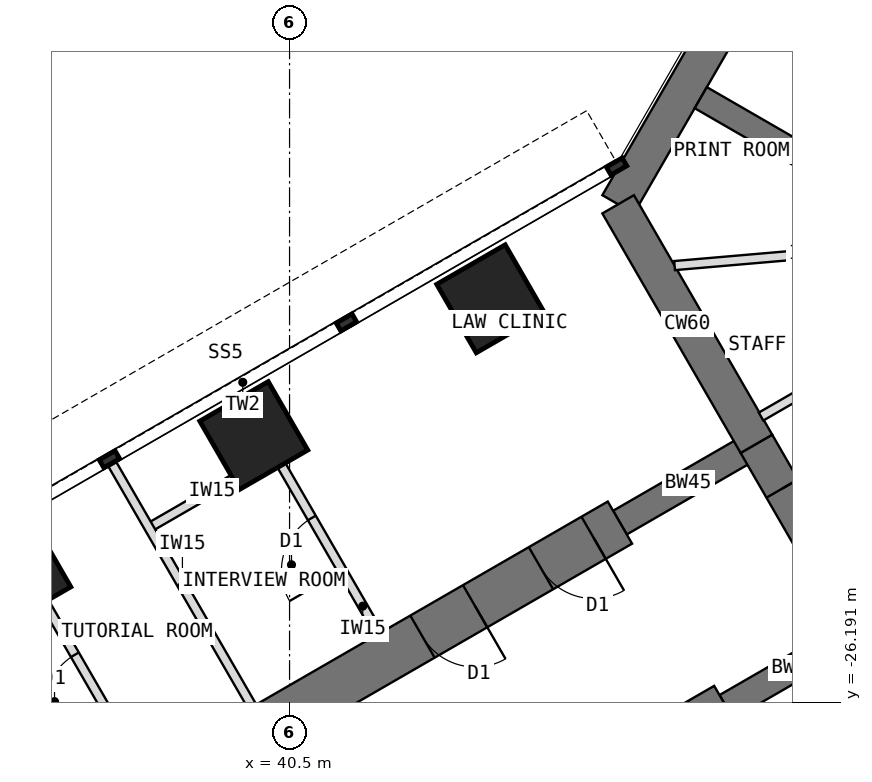
"""IFC4 building model, lengths in metres.
Left out: names, types, materials, properties, quantities, classifications, styles, units other than length and angle.
Written with IfcOpenShell. Run it as: python <this file> out.ifc"""

import sys

from ifc_helpers import new_model, si_unit, direction, frame, frame_2d, origin, origin_2d, place, context, subcontext, project, spatial, rectangle, extrude, element, fill, save


model = new_model("IFC4")
c1 = context("Model", 3, precision=1e-05, world=origin(), true_north=direction((0.0, 1.0)))
c2 = subcontext(c1, "Body", "Model", "MODEL_VIEW")
j1 = project(units=[si_unit("LENGTHUNIT", "METRE"), si_unit("PLANEANGLEUNIT", "RADIAN")], contexts=[c1])
p1 = place(None, origin())
s1 = spatial("IfcSite", under=j1, at=p1, CompositionType="ELEMENT")
p2 = place(p1, origin())
s2 = spatial("IfcBuilding", under=s1, at=p2, CompositionType="ELEMENT")
p3 = place(p2, frame((0.0, 0.0, 133.5)))
s3 = spatial("IfcBuildingStorey", under=s2, at=p3, CompositionType="ELEMENT", Elevation=133.5)
p4 = place(p3, frame((52.202, -7.092, 0.0), z_axis=(0.0, 0.0, 1.0), x_axis=(-0.500005998175, -0.866021940709, 0.0)))
e1 = element("IfcWall", 1, at=p4, inside=s3, PredefinedType="SHEAR", context=c2, shape_type="SweptSolid", body=[
    extrude(rectangle(XDim=12.596, YDim=0.6, at=frame_2d((6.298, 0.0))), origin(), (0.0, 0.0, 1.0), 4.0),
])
p5 = place(p3, frame((45.904, -18.0, 0.0), z_axis=(0.0, 0.0, 1.0), x_axis=(0.500024481964, -0.866011268655, 0.0)))
e2 = element("IfcWall", 2, at=p5, inside=s3, PredefinedType="SHEAR", context=c2, shape_type="SweptSolid", body=[
    extrude(rectangle(XDim=4.548, YDim=0.6, at=frame_2d((2.274, 0.0))), origin(), (0.0, 0.0, 1.0), 4.0),
])
p6 = place(p3, frame((48.178, -21.939, 0.0), z_axis=(0.0, 0.0, 1.0), x_axis=(0.500010275428, -0.866019471182, 0.0)))
e3 = element("IfcWall", 3, at=p6, inside=s3, PredefinedType="SHEAR", context=c2, shape_type="SweptSolid", body=[
    extrude(rectangle(XDim=3.5, YDim=0.6, at=frame_2d((1.75, 0.0))), origin(), (0.0, 0.0, 1.0), 4.0),
])
p7 = place(p6, frame((0.85, 0.0, 0.0)))
e4 = element("IfcOpeningElement", 4, at=p7, cuts=e3, PredefinedType="OPENING", context=c2, shape_type="SweptSolid", body=[
    extrude(rectangle(XDim=1.8, YDim=2.1, at=frame_2d((0.9, 1.05))), frame((0.0, 0.31, 0.0), z_axis=(0.0, -1.0, 0.0), x_axis=(1.0, 0.0, 0.0)), (0.0, 0.0, 1.0), 0.62),
])
p8 = place(p3, frame((49.928, -24.97, 0.0), z_axis=(0.0, 0.0, 1.0), x_axis=(-0.866031863473, -0.499988811324, 0.0)))
e5 = element("IfcWall", 5, at=p8, inside=s3, PredefinedType="SHEAR", context=c2, shape_type="SweptSolid", body=[
    extrude(rectangle(XDim=2.592, YDim=0.45, at=frame_2d((1.296, 0.0))), origin(), (0.0, 0.0, 1.0), 4.0),
])
p9 = place(p3, frame((47.684, -26.266, 0.0), z_axis=(0.0, 0.0, 1.0), x_axis=(-0.866027579429, -0.499996231654, 0.0)))
e6 = element("IfcWall", 6, at=p9, inside=s3, PredefinedType="SHEAR", context=c2, shape_type="SweptSolid", body=[
    extrude(rectangle(XDim=13.2, YDim=0.8, at=frame_2d((6.6, 0.0))), origin(), (0.0, 0.0, 1.0), 4.0),
])
p10 = place(p9, frame((0.5, 0.0, 0.0)))
e7 = element("IfcOpeningElement", 7, at=p10, cuts=e6, PredefinedType="OPENING", context=c2, shape_type="SweptSolid", body=[
    extrude(rectangle(XDim=1.0, YDim=2.1, at=frame_2d((0.5, 1.05))), frame((0.0, 0.41, 0.0), z_axis=(0.0, -1.0, 0.0), x_axis=(1.0, 0.0, 0.0)), (0.0, 0.0, 1.0), 0.82),
])
p11 = place(p9, frame((2.75, 0.0, 0.0)))
e8 = element("IfcOpeningElement", 8, at=p11, cuts=e6, PredefinedType="OPENING", context=c2, shape_type="SweptSolid", body=[
    extrude(rectangle(XDim=1.0, YDim=2.1, at=frame_2d((0.5, 1.05))), frame((0.0, 0.41, 0.0), z_axis=(0.0, -1.0, 0.0), x_axis=(1.0, 0.0, 0.0)), (0.0, 0.0, 1.0), 0.82),
])
p12 = place(p9, frame((7.25, 0.0, 0.0)))
e9 = element("IfcOpeningElement", 9, at=p12, cuts=e6, PredefinedType="OPENING", context=c2, shape_type="SweptSolid", body=[
    extrude(rectangle(XDim=1.0, YDim=2.1, at=frame_2d((0.5, 1.05))), frame((0.0, 0.41, 0.0), z_axis=(0.0, -1.0, 0.0), x_axis=(1.0, 0.0, 0.0)), (0.0, 0.0, 1.0), 0.82),
])
p13 = place(p3, frame((48.178, -21.939, 0.0), z_axis=(0.0, 0.0, 1.0), x_axis=(-0.866072649678, -0.499918158782, 0.0)))
e10 = element("IfcWall", 10, at=p13, inside=s3, PredefinedType="SHEAR", context=c2, shape_type="SweptSolid", body=[
    extrude(rectangle(XDim=2.592, YDim=0.45, at=frame_2d((1.296, 0.0))), origin(), (0.0, 0.0, 1.0), 4.0),
])
p14 = place(p3, frame((45.934, -23.234, 0.0), z_axis=(0.0, 0.0, 1.0), x_axis=(-0.866019570528, -0.500010103361, 0.0)))
e11 = element("IfcWall", 11, at=p14, inside=s3, PredefinedType="SHEAR", context=c2, shape_type="SweptSolid", body=[
    extrude(rectangle(XDim=13.2, YDim=0.8, at=frame_2d((6.6, 0.0))), origin(), (0.0, 0.0, 1.0), 4.0),
])
p15 = place(p14, frame((0.5, 0.0, 0.0)))
e12 = element("IfcOpeningElement", 12, at=p15, cuts=e11, PredefinedType="OPENING", context=c2, shape_type="SweptSolid", body=[
    extrude(rectangle(XDim=1.0, YDim=2.1, at=frame_2d((0.5, 1.05))), frame((0.0, 0.41, 0.0), z_axis=(0.0, -1.0, 0.0), x_axis=(1.0, 0.0, 0.0)), (0.0, 0.0, 1.0), 0.82),
])
p16 = place(p14, frame((2.75, 0.0, 0.0)))
e13 = element("IfcOpeningElement", 13, at=p16, cuts=e11, PredefinedType="OPENING", context=c2, shape_type="SweptSolid", body=[
    extrude(rectangle(XDim=1.0, YDim=2.1, at=frame_2d((0.5, 1.05))), frame((0.0, 0.41, 0.0), z_axis=(0.0, -1.0, 0.0), x_axis=(1.0, 0.0, 0.0)), (0.0, 0.0, 1.0), 0.82),
])
p17 = place(p14, frame((7.25, 0.0, 0.0)))
e14 = element("IfcOpeningElement", 14, at=p17, cuts=e11, PredefinedType="OPENING", context=c2, shape_type="SweptSolid", body=[
    extrude(rectangle(XDim=1.0, YDim=2.1, at=frame_2d((0.5, 1.05))), frame((0.0, 0.41, 0.0), z_axis=(0.0, -1.0, 0.0), x_axis=(1.0, 0.0, 0.0)), (0.0, 0.0, 1.0), 0.82),
])
for number, where, z_axis, x_axis in (
    (15, (43.809, -19.554, 0.0), (0.0, 0.0, 1.0), (0.866, 0.5, 0.0)),
    (16, (39.912, -21.804, 0.0), (0.0, 0.0, 1.0), (0.866, 0.5, 0.0)),
    (17, (36.014, -24.054, 0.0), (0.0, 0.0, 1.0), (0.866, 0.5, 0.0)),
):
    element("IfcColumn", number, at=place(p3, frame(where, z_axis=z_axis, x_axis=x_axis)), inside=s3, PredefinedType="COLUMN", context=c2, shape_type="SweptSolid", body=[
        extrude(rectangle(XDim=1.3, YDim=1.3, at=origin_2d()), origin(), (0.0, 0.0, 1.0), 4.0),
    ])
p18 = place(p3, frame((52.38, -19.201, 0.0), z_axis=(0.0, 0.0, 1.0), x_axis=(-0.866027317282, 0.49999668571, 0.0)))
e18 = element("IfcWall", 18, at=p18, inside=s3, PredefinedType="SHEAR", context=c2, shape_type="SweptSolid", body=[
    extrude(rectangle(XDim=5.908, YDim=0.4, at=frame_2d((2.954, 0.0))), origin(), (0.0, 0.0, 1.0), 4.0),
])
p19 = place(p3, frame((39.888, -26.263, 0.0), z_axis=(0.0, 0.0, 1.0), x_axis=(-0.500014953309, 0.866016770315, 0.0)))
e19 = element("IfcWall", 19, at=p19, inside=s3, PredefinedType="PARTITIONING", context=c2, shape_type="SweptSolid", body=[
    extrude(rectangle(XDim=4.6, YDim=0.15, at=frame_2d((2.3, 0.0))), origin(), (0.0, 0.0, 1.0), 3.8),
])
p20 = place(p3, frame((40.266, -22.119, 0.0), z_axis=(0.0, 0.0, 1.0), x_axis=(-0.866024647952, -0.500001309137, 0.0)))
e20 = element("IfcWall", 20, at=p20, inside=s3, PredefinedType="PARTITIONING", context=c2, shape_type="SweptSolid", body=[
    extrude(rectangle(XDim=2.4, YDim=0.15, at=frame_2d((1.2, 0.0))), origin(), (0.0, 0.0, 1.0), 3.8),
])
p21 = place(p3, frame((41.967, -25.063, 0.0), z_axis=(0.0, 0.0, 1.0), x_axis=(-0.500062241894, 0.865989465428, 0.0)))
e21 = element("IfcWall", 21, at=p21, inside=s3, PredefinedType="PARTITIONING", context=c2, shape_type="SweptSolid", body=[
    extrude(rectangle(XDim=3.4, YDim=0.15, at=frame_2d((1.7, 0.0))), origin(), (0.0, 0.0, 1.0), 3.8),
])
p22 = place(p21, frame((1.2, 0.0, 0.0)))
e22 = element("IfcOpeningElement", 22, at=p22, cuts=e21, PredefinedType="OPENING", context=c2, shape_type="SweptSolid", body=[
    extrude(rectangle(XDim=1.0, YDim=2.1, at=frame_2d((0.5, 1.05))), frame((0.0, 0.085, 0.0), z_axis=(0.0, -1.0, 0.0), x_axis=(1.0, 0.0, 0.0)), (0.0, 0.0, 1.0), 0.17),
])
p23 = place(p3, frame((38.069, -27.313, 0.0), z_axis=(0.0, 0.0, 1.0), x_axis=(-0.500008388397, 0.866020560687, 0.0)))
e23 = element("IfcWall", 23, at=p23, inside=s3, PredefinedType="PARTITIONING", context=c2, shape_type="SweptSolid", body=[
    extrude(rectangle(XDim=3.4, YDim=0.15, at=frame_2d((1.7, 0.0))), origin(), (0.0, 0.0, 1.0), 3.8),
])
p24 = place(p23, frame((1.2, 0.0, 0.0)))
e24 = element("IfcOpeningElement", 24, at=p24, cuts=e23, PredefinedType="OPENING", context=c2, shape_type="SweptSolid", body=[
    extrude(rectangle(XDim=1.0, YDim=2.1, at=frame_2d((0.5, 1.05))), frame((0.0, 0.085, 0.0), z_axis=(0.0, -1.0, 0.0), x_axis=(1.0, 0.0, 0.0)), (0.0, 0.0, 1.0), 0.17),
])
p25 = place(p3, frame((48.254, -21.49, 0.0), z_axis=(0.0, 0.0, 1.0), x_axis=(0.866025707867, 0.499999473313, 0.0)))
e25 = element("IfcWall", 25, at=p25, inside=s3, PredefinedType="PARTITIONING", context=c2, shape_type="SweptSolid", body=[
    extrude(rectangle(XDim=4.476, YDim=0.15, at=frame_2d((2.238, 0.0))), origin(), (0.0, 0.0, 1.0), 3.8),
])
p26 = place(p25, frame((2.633, 0.0, 0.0)))
e26 = element("IfcOpeningElement", 26, at=p26, cuts=e25, PredefinedType="OPENING", context=c2, shape_type="SweptSolid", body=[
    extrude(rectangle(XDim=1.0, YDim=2.1, at=frame_2d((0.5, 1.05))), frame((0.0, 0.085, 0.0), z_axis=(0.0, -1.0, 0.0), x_axis=(1.0, 0.0, 0.0)), (0.0, 0.0, 1.0), 0.17),
])
p27 = place(p3, frame((51.367, -18.616, 0.0), z_axis=(0.0, 0.0, 1.0), x_axis=(-0.996291540593, -0.086041653535, 0.0)))
e27 = element("IfcWall", 27, at=p27, inside=s3, PredefinedType="PARTITIONING", context=c2, shape_type="SweptSolid", body=[
    extrude(rectangle(XDim=4.551, YDim=0.15, at=frame_2d((2.276, 0.0))), origin(), (0.0, 0.0, 1.0), 3.8),
])
p28 = place(p27, frame((0.865, 0.0, 0.0)))
e28 = element("IfcOpeningElement", 28, at=p28, cuts=e27, PredefinedType="OPENING", context=c2, shape_type="SweptSolid", body=[
    extrude(rectangle(XDim=1.0, YDim=2.1, at=frame_2d((0.5, 1.05))), frame((0.0, 0.085, 0.0), z_axis=(0.0, -1.0, 0.0), x_axis=(1.0, 0.0, 0.0)), (0.0, 0.0, 1.0), 0.17),
])
p29 = place(p7, origin())
e29 = element("IfcDoor", 29, at=p29, inside=s3, OperationType="DOUBLE_DOOR_DOUBLE_SWING", PredefinedType="DOOR", context=c2, shape_type="SweptSolid", body=[
    extrude(rectangle(XDim=1.72, YDim=2.06, at=frame_2d((0.9, 1.03))), frame((0.0, 0.025, 0.0), z_axis=(0.0, -1.0, 0.0), x_axis=(1.0, 0.0, 0.0)), (0.0, 0.0, 1.0), 0.05),
    extrude(rectangle(XDim=0.04, YDim=2.1, at=frame_2d((0.02, 1.05))), frame((0.0, 0.3, 0.0), z_axis=(0.0, -1.0, 0.0), x_axis=(1.0, 0.0, 0.0)), (0.0, 0.0, 1.0), 0.6),
    extrude(rectangle(XDim=0.04, YDim=2.1, at=frame_2d((1.78, 1.05))), frame((0.0, 0.3, 0.0), z_axis=(0.0, -1.0, 0.0), x_axis=(1.0, 0.0, 0.0)), (0.0, 0.0, 1.0), 0.6),
    extrude(rectangle(XDim=1.72, YDim=0.04, at=frame_2d((0.9, 2.08))), frame((0.0, 0.3, 0.0), z_axis=(0.0, -1.0, 0.0), x_axis=(1.0, 0.0, 0.0)), (0.0, 0.0, 1.0), 0.6),
])
fill(e4, e29)
p30 = place(p22, origin())
e30 = element("IfcDoor", 30, at=p30, inside=s3, OperationType="SINGLE_SWING_LEFT", PredefinedType="DOOR", context=c2, shape_type="SweptSolid", body=[
    extrude(rectangle(XDim=1.0, YDim=2.1, at=frame_2d((0.5, 1.05))), frame((0.0, 0.025, 0.0), z_axis=(0.0, -1.0, 0.0), x_axis=(1.0, 0.0, 0.0)), (0.0, 0.0, 1.0), 0.05),
])
fill(e22, e30)
p31 = place(p24, origin())
e31 = element("IfcDoor", 31, at=p31, inside=s3, OperationType="SINGLE_SWING_LEFT", PredefinedType="DOOR", context=c2, shape_type="SweptSolid", body=[
    extrude(rectangle(XDim=1.0, YDim=2.1, at=frame_2d((0.5, 1.05))), frame((0.0, 0.025, 0.0), z_axis=(0.0, -1.0, 0.0), x_axis=(1.0, 0.0, 0.0)), (0.0, 0.0, 1.0), 0.05),
])
fill(e24, e31)
p32 = place(p10, origin())
e32 = element("IfcDoor", 32, at=p32, inside=s3, OperationType="SINGLE_SWING_LEFT", PredefinedType="DOOR", context=c2, shape_type="SweptSolid", body=[
    extrude(rectangle(XDim=0.92, YDim=2.06, at=frame_2d((0.5, 1.03))), frame((0.0, 0.025, 0.0), z_axis=(0.0, -1.0, 0.0), x_axis=(1.0, 0.0, 0.0)), (0.0, 0.0, 1.0), 0.05),
    extrude(rectangle(XDim=0.04, YDim=2.1, at=frame_2d((0.02, 1.05))), frame((0.0, 0.4, 0.0), z_axis=(0.0, -1.0, 0.0), x_axis=(1.0, 0.0, 0.0)), (0.0, 0.0, 1.0), 0.8),
    extrude(rectangle(XDim=0.04, YDim=2.1, at=frame_2d((0.98, 1.05))), frame((0.0, 0.4, 0.0), z_axis=(0.0, -1.0, 0.0), x_axis=(1.0, 0.0, 0.0)), (0.0, 0.0, 1.0), 0.8),
    extrude(rectangle(XDim=0.92, YDim=0.04, at=frame_2d((0.5, 2.08))), frame((0.0, 0.4, 0.0), z_axis=(0.0, -1.0, 0.0), x_axis=(1.0, 0.0, 0.0)), (0.0, 0.0, 1.0), 0.8),
])
fill(e7, e32)
p33 = place(p15, origin())
e33 = element("IfcDoor", 33, at=p33, inside=s3, OperationType="SINGLE_SWING_LEFT", PredefinedType="DOOR", context=c2, shape_type="SweptSolid", body=[
    extrude(rectangle(XDim=0.92, YDim=2.06, at=frame_2d((0.5, 1.03))), frame((0.0, 0.025, 0.0), z_axis=(0.0, -1.0, 0.0), x_axis=(1.0, 0.0, 0.0)), (0.0, 0.0, 1.0), 0.05),
    extrude(rectangle(XDim=0.04, YDim=2.1, at=frame_2d((0.02, 1.05))), frame((0.0, 0.4, 0.0), z_axis=(0.0, -1.0, 0.0), x_axis=(1.0, 0.0, 0.0)), (0.0, 0.0, 1.0), 0.8),
    extrude(rectangle(XDim=0.04, YDim=2.1, at=frame_2d((0.98, 1.05))), frame((0.0, 0.4, 0.0), z_axis=(0.0, -1.0, 0.0), x_axis=(1.0, 0.0, 0.0)), (0.0, 0.0, 1.0), 0.8),
    extrude(rectangle(XDim=0.92, YDim=0.04, at=frame_2d((0.5, 2.08))), frame((0.0, 0.4, 0.0), z_axis=(0.0, -1.0, 0.0), x_axis=(1.0, 0.0, 0.0)), (0.0, 0.0, 1.0), 0.8),
])
fill(e12, e33)
p34 = place(p16, origin())
e34 = element("IfcDoor", 34, at=p34, inside=s3, OperationType="SINGLE_SWING_LEFT", PredefinedType="DOOR", context=c2, shape_type="SweptSolid", body=[
    extrude(rectangle(XDim=0.92, YDim=2.06, at=frame_2d((0.5, 1.03))), frame((0.0, 0.025, 0.0), z_axis=(0.0, -1.0, 0.0), x_axis=(1.0, 0.0, 0.0)), (0.0, 0.0, 1.0), 0.05),
    extrude(rectangle(XDim=0.04, YDim=2.1, at=frame_2d((0.02, 1.05))), frame((0.0, 0.4, 0.0), z_axis=(0.0, -1.0, 0.0), x_axis=(1.0, 0.0, 0.0)), (0.0, 0.0, 1.0), 0.8),
    extrude(rectangle(XDim=0.04, YDim=2.1, at=frame_2d((0.98, 1.05))), frame((0.0, 0.4, 0.0), z_axis=(0.0, -1.0, 0.0), x_axis=(1.0, 0.0, 0.0)), (0.0, 0.0, 1.0), 0.8),
    extrude(rectangle(XDim=0.92, YDim=0.04, at=frame_2d((0.5, 2.08))), frame((0.0, 0.4, 0.0), z_axis=(0.0, -1.0, 0.0), x_axis=(1.0, 0.0, 0.0)), (0.0, 0.0, 1.0), 0.8),
])
fill(e13, e34)
save(model, sys.argv[1])
